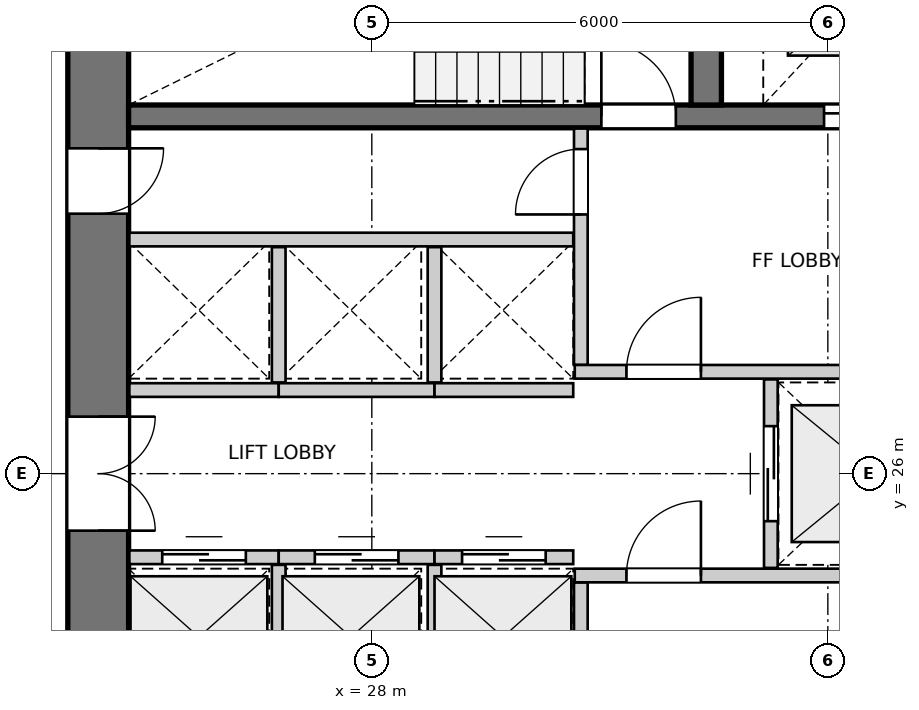
"""IFC4 building model, lengths in metres.
Left out: names, types, materials, properties, quantities, classifications, styles, units other than length and angle.
Written with IfcOpenShell. Run it as: python <this file> out.ifc"""

import sys

from ifc_helpers import new_model, si_unit, direction, frame, frame_2d, origin, place, context, subcontext, project, spatial, rectangle, extrude, source, transform, mapped, element, fill, save


model = new_model("IFC4")
c1 = context("Model", 3, precision=1e-05, world=origin(), true_north=direction((0.0, 1.0)))
c2 = subcontext(c1, "Body", "Model", "MODEL_VIEW")
j1 = project(units=[si_unit("LENGTHUNIT", "METRE"), si_unit("PLANEANGLEUNIT", "RADIAN")], contexts=[c1])
p1 = place(None, origin())
s1 = spatial("IfcSite", under=j1, at=p1, CompositionType="ELEMENT")
p2 = place(p1, origin())
s2 = spatial("IfcBuilding", under=s1, at=p2, CompositionType="ELEMENT")
p3 = place(p2, frame((0.0, 0.0, 14.2)))
s3 = spatial("IfcBuildingStorey", under=s2, at=p3, CompositionType="ELEMENT", Elevation=14.2)
p4 = place(p3, frame((24.4, 33.8, 0.0), z_axis=(0.0, 0.0, 1.0), x_axis=(0.0, -1.0, 0.0)))
e1 = element("IfcWall", 1, at=p4, inside=s3, PredefinedType="SHEAR", context=c2, shape_type="SweptSolid", body=[
    extrude(rectangle(XDim=15.6, YDim=0.8, at=frame_2d((7.8, 0.0))), origin(), (0.0, 0.0, 1.0), 2.94),
])
p5 = place(p4, frame((7.05, 0.0, 0.0)))
e2 = element("IfcOpeningElement", 2, at=p5, cuts=e1, PredefinedType="OPENING", context=c2, shape_type="SweptSolid", body=[
    extrude(rectangle(XDim=1.5, YDim=2.15, at=frame_2d((0.75, 1.075))), frame((0.0, 0.41, 0.0), z_axis=(0.0, -1.0, 0.0), x_axis=(1.0, 0.0, 0.0)), (0.0, 0.0, 1.0), 0.82),
])
p6 = place(p4, frame((3.52, 0.0, 0.0)))
e3 = element("IfcOpeningElement", 3, at=p6, cuts=e1, PredefinedType="OPENING", context=c2, shape_type="SweptSolid", body=[
    extrude(rectangle(XDim=0.86, YDim=2.05, at=frame_2d((0.43, 1.025))), frame((0.0, 0.41, 0.0), z_axis=(0.0, -1.0, 0.0), x_axis=(1.0, 0.0, 0.0)), (0.0, 0.0, 1.0), 0.82),
])
p7 = place(p4, frame((11.22, 0.0, 0.0)))
e4 = element("IfcOpeningElement", 4, at=p7, cuts=e1, PredefinedType="OPENING", context=c2, shape_type="SweptSolid", body=[
    extrude(rectangle(XDim=0.86, YDim=2.05, at=frame_2d((0.43, 1.025))), frame((0.0, 0.41, 0.0), z_axis=(0.0, -1.0, 0.0), x_axis=(1.0, 0.0, 0.0)), (0.0, 0.0, 1.0), 0.82),
])
p8 = place(p3, frame((24.8, 30.7, 0.0), z_axis=(0.0, 0.0, 1.0), x_axis=(1.0, 0.0, 0.0)))
e5 = element("IfcWall", 5, at=p8, inside=s3, PredefinedType="SHEAR", context=c2, shape_type="SweptSolid", body=[
    extrude(rectangle(XDim=11.1, YDim=0.3, at=frame_2d((5.55, 0.0))), origin(), (0.0, 0.0, 1.0), 2.94),
])
p9 = place(p8, frame((6.22, 0.0, 0.0)))
e6 = element("IfcOpeningElement", 6, at=p9, cuts=e5, PredefinedType="OPENING", context=c2, shape_type="SweptSolid", body=[
    extrude(rectangle(XDim=0.98, YDim=2.15, at=frame_2d((0.49, 1.075))), frame((0.0, 0.16, 0.0), z_axis=(0.0, -1.0, 0.0), x_axis=(1.0, 0.0, 0.0)), (0.0, 0.0, 1.0), 0.32),
])
p10 = place(p8, frame((9.15, 0.0, 0.0)))
e7 = element("IfcOpeningElement", 7, at=p10, cuts=e5, PredefinedType="OPENING", context=c2, shape_type="SweptSolid", body=[
    extrude(rectangle(XDim=1.15, YDim=2.15, at=frame_2d((0.575, 1.075))), frame((0.0, 0.16, 0.0), z_axis=(0.0, -1.0, 0.0), x_axis=(1.0, 0.0, 0.0)), (0.0, 0.0, 1.0), 0.32),
])
p11 = place(p3, frame((32.4, 30.85, 0.0), z_axis=(0.0, 0.0, 1.0), x_axis=(0.0, 1.0, 0.0)))
e8 = element("IfcWall", 8, at=p11, inside=s3, PredefinedType="SHEAR", context=c2, shape_type="SweptSolid", body=[
    extrude(rectangle(XDim=2.95, YDim=0.4, at=frame_2d((1.475, 0.0))), origin(), (0.0, 0.0, 1.0), 2.94),
])
p12 = place(p3, frame((30.75, 21.46, 0.0), z_axis=(0.0, 0.0, 1.0), x_axis=(0.0, 1.0, 0.0)))
e9 = element("IfcWall", 9, at=p12, inside=s3, PredefinedType="PARTITIONING", context=c2, shape_type="SweptSolid", body=[
    extrude(rectangle(XDim=3.11, YDim=0.18, at=frame_2d((1.555, 0.0))), origin(), (0.0, 0.0, 1.0), 2.94),
])
p13 = place(p12, frame((0.26, 0.0, 0.0)))
e10 = element("IfcOpeningElement", 10, at=p13, cuts=e9, PredefinedType="OPENING", context=c2, shape_type="SweptSolid", body=[
    extrude(rectangle(XDim=0.86, YDim=2.05, at=frame_2d((0.43, 1.025))), frame((0.0, 0.1, 0.0), z_axis=(0.0, -1.0, 0.0), x_axis=(1.0, 0.0, 0.0)), (0.0, 0.0, 1.0), 0.2),
])
p14 = place(p3, frame((30.67, 24.66, 0.0), z_axis=(0.0, 0.0, 1.0), x_axis=(1.0, 0.0, 0.0)))
e11 = element("IfcWall", 11, at=p14, inside=s3, PredefinedType="PARTITIONING", context=c2, shape_type="SweptSolid", body=[
    extrude(rectangle(XDim=5.22, YDim=0.18, at=frame_2d((2.61, 0.0))), origin(), (0.0, 0.0, 1.0), 2.94),
])
p15 = place(p14, frame((0.68, 0.0, 0.0)))
e12 = element("IfcOpeningElement", 12, at=p15, cuts=e11, PredefinedType="OPENING", context=c2, shape_type="SweptSolid", body=[
    extrude(rectangle(XDim=0.98, YDim=2.15, at=frame_2d((0.49, 1.075))), frame((0.0, 0.1, 0.0), z_axis=(0.0, -1.0, 0.0), x_axis=(1.0, 0.0, 0.0)), (0.0, 0.0, 1.0), 0.2),
])
p16 = place(p3, frame((30.75, 27.43, 0.0), z_axis=(0.0, 0.0, 1.0), x_axis=(0.0, 1.0, 0.0)))
e13 = element("IfcWall", 13, at=p16, inside=s3, PredefinedType="PARTITIONING", context=c2, shape_type="SweptSolid", body=[
    extrude(rectangle(XDim=3.11, YDim=0.18, at=frame_2d((1.555, 0.0))), origin(), (0.0, 0.0, 1.0), 2.94),
])
p17 = place(p16, frame((1.98, 0.0, 0.0)))
e14 = element("IfcOpeningElement", 14, at=p17, cuts=e13, PredefinedType="OPENING", context=c2, shape_type="SweptSolid", body=[
    extrude(rectangle(XDim=0.86, YDim=2.05, at=frame_2d((0.43, 1.025))), frame((0.0, 0.1, 0.0), z_axis=(0.0, -1.0, 0.0), x_axis=(1.0, 0.0, 0.0)), (0.0, 0.0, 1.0), 0.2),
])
p18 = place(p3, frame((30.67, 27.34, 0.0), z_axis=(0.0, 0.0, 1.0), x_axis=(1.0, 0.0, 0.0)))
e15 = element("IfcWall", 15, at=p18, inside=s3, PredefinedType="PARTITIONING", context=c2, shape_type="SweptSolid", body=[
    extrude(rectangle(XDim=5.22, YDim=0.18, at=frame_2d((2.61, 0.0))), origin(), (0.0, 0.0, 1.0), 2.94),
])
p19 = place(p18, frame((0.68, 0.0, 0.0)))
e16 = element("IfcOpeningElement", 16, at=p19, cuts=e15, PredefinedType="OPENING", context=c2, shape_type="SweptSolid", body=[
    extrude(rectangle(XDim=0.98, YDim=2.15, at=frame_2d((0.49, 1.075))), frame((0.0, 0.1, 0.0), z_axis=(0.0, -1.0, 0.0), x_axis=(1.0, 0.0, 0.0)), (0.0, 0.0, 1.0), 0.2),
])
p20 = place(p3, frame((33.25, 24.76, 0.0), z_axis=(0.0, 0.0, 1.0), x_axis=(0.0, 1.0, 0.0)))
e17 = element("IfcWall", 17, at=p20, inside=s3, PredefinedType="PARTITIONING", context=c2, shape_type="SweptSolid", body=[
    extrude(rectangle(XDim=2.48, YDim=0.18, at=frame_2d((1.24, 0.0))), origin(), (0.0, 0.0, 1.0), 2.94),
])
p21 = place(p20, frame((0.615, 0.0, 0.0)))
e18 = element("IfcOpeningElement", 18, at=p21, cuts=e17, PredefinedType="OPENING", context=c2, shape_type="SweptSolid", body=[
    extrude(rectangle(XDim=1.25, YDim=2.15, at=frame_2d((0.625, 1.075))), frame((0.0, 0.1, 0.0), z_axis=(0.0, -1.0, 0.0), x_axis=(1.0, 0.0, 0.0)), (0.0, 0.0, 1.0), 0.2),
])
p22 = place(p3, frame((24.81, 24.9, 0.0), z_axis=(0.0, 0.0, 1.0), x_axis=(1.0, 0.0, 0.0)))
e19 = element("IfcWall", 19, at=p22, inside=s3, PredefinedType="PARTITIONING", context=c2, shape_type="SweptSolid", body=[
    extrude(rectangle(XDim=1.965, YDim=0.18, at=frame_2d((0.982, 0.0))), origin(), (0.0, 0.0, 1.0), 2.94),
])
p23 = place(p22, frame((0.433, 0.0, 0.0)))
e20 = element("IfcOpeningElement", 20, at=p23, cuts=e19, PredefinedType="OPENING", context=c2, shape_type="SweptSolid", body=[
    extrude(rectangle(XDim=1.1, YDim=2.15, at=frame_2d((0.55, 1.075))), frame((0.0, 0.1, 0.0), z_axis=(0.0, -1.0, 0.0), x_axis=(1.0, 0.0, 0.0)), (0.0, 0.0, 1.0), 0.2),
])
p24 = place(p3, frame((26.775, 24.9, 0.0), z_axis=(0.0, 0.0, 1.0), x_axis=(1.0, 0.0, 0.0)))
e21 = element("IfcWall", 21, at=p24, inside=s3, PredefinedType="PARTITIONING", context=c2, shape_type="SweptSolid", body=[
    extrude(rectangle(XDim=2.05, YDim=0.18, at=frame_2d((1.025, 0.0))), origin(), (0.0, 0.0, 1.0), 2.94),
])
p25 = place(p24, frame((0.475, 0.0, 0.0)))
e22 = element("IfcOpeningElement", 22, at=p25, cuts=e21, PredefinedType="OPENING", context=c2, shape_type="SweptSolid", body=[
    extrude(rectangle(XDim=1.1, YDim=2.15, at=frame_2d((0.55, 1.075))), frame((0.0, 0.1, 0.0), z_axis=(0.0, -1.0, 0.0), x_axis=(1.0, 0.0, 0.0)), (0.0, 0.0, 1.0), 0.2),
])
p26 = place(p3, frame((26.775, 23.02, 0.0), z_axis=(0.0, 0.0, 1.0), x_axis=(0.0, 1.0, 0.0)))
e23 = element("IfcWall", 23, at=p26, inside=s3, PredefinedType="PARTITIONING", context=c2, shape_type="SweptSolid", body=[
    extrude(rectangle(XDim=1.78, YDim=0.18, at=frame_2d((0.89, 0.0))), origin(), (0.0, 0.0, 1.0), 2.94),
])
p27 = place(p3, frame((28.825, 24.9, 0.0), z_axis=(0.0, 0.0, 1.0), x_axis=(1.0, 0.0, 0.0)))
e24 = element("IfcWall", 24, at=p27, inside=s3, PredefinedType="PARTITIONING", context=c2, shape_type="SweptSolid", body=[
    extrude(rectangle(XDim=1.825, YDim=0.18, at=frame_2d((0.913, 0.0))), origin(), (0.0, 0.0, 1.0), 2.94),
])
p28 = place(p27, frame((0.363, 0.0, 0.0)))
e25 = element("IfcOpeningElement", 25, at=p28, cuts=e24, PredefinedType="OPENING", context=c2, shape_type="SweptSolid", body=[
    extrude(rectangle(XDim=1.1, YDim=2.15, at=frame_2d((0.55, 1.075))), frame((0.0, 0.1, 0.0), z_axis=(0.0, -1.0, 0.0), x_axis=(1.0, 0.0, 0.0)), (0.0, 0.0, 1.0), 0.2),
])
p29 = place(p3, frame((28.825, 23.02, 0.0), z_axis=(0.0, 0.0, 1.0), x_axis=(0.0, 1.0, 0.0)))
e26 = element("IfcWall", 26, at=p29, inside=s3, PredefinedType="PARTITIONING", context=c2, shape_type="SweptSolid", body=[
    extrude(rectangle(XDim=1.78, YDim=0.18, at=frame_2d((0.89, 0.0))), origin(), (0.0, 0.0, 1.0), 2.94),
])
p30 = place(p3, frame((24.81, 29.08, 0.0), z_axis=(0.0, 0.0, 1.0), x_axis=(1.0, 0.0, 0.0)))
e27 = element("IfcWall", 27, at=p30, inside=s3, PredefinedType="PARTITIONING", context=c2, shape_type="SweptSolid", body=[
    extrude(rectangle(XDim=5.84, YDim=0.18, at=frame_2d((2.92, 0.0))), origin(), (0.0, 0.0, 1.0), 2.94),
])
p31 = place(p3, frame((24.81, 27.1, 0.0), z_axis=(0.0, 0.0, 1.0), x_axis=(1.0, 0.0, 0.0)))
e28 = element("IfcWall", 28, at=p31, inside=s3, PredefinedType="PARTITIONING", context=c2, shape_type="SweptSolid", body=[
    extrude(rectangle(XDim=1.965, YDim=0.18, at=frame_2d((0.982, 0.0))), origin(), (0.0, 0.0, 1.0), 2.94),
])
p32 = place(p3, frame((26.775, 27.1, 0.0), z_axis=(0.0, 0.0, 1.0), x_axis=(1.0, 0.0, 0.0)))
e29 = element("IfcWall", 29, at=p32, inside=s3, PredefinedType="PARTITIONING", context=c2, shape_type="SweptSolid", body=[
    extrude(rectangle(XDim=2.05, YDim=0.18, at=frame_2d((1.025, 0.0))), origin(), (0.0, 0.0, 1.0), 2.94),
])
p33 = place(p3, frame((26.775, 27.2, 0.0), z_axis=(0.0, 0.0, 1.0), x_axis=(0.0, 1.0, 0.0)))
e30 = element("IfcWall", 30, at=p33, inside=s3, PredefinedType="PARTITIONING", context=c2, shape_type="SweptSolid", body=[
    extrude(rectangle(XDim=1.78, YDim=0.18, at=frame_2d((0.89, 0.0))), origin(), (0.0, 0.0, 1.0), 2.94),
])
p34 = place(p3, frame((28.825, 27.1, 0.0), z_axis=(0.0, 0.0, 1.0), x_axis=(1.0, 0.0, 0.0)))
e31 = element("IfcWall", 31, at=p34, inside=s3, PredefinedType="PARTITIONING", context=c2, shape_type="SweptSolid", body=[
    extrude(rectangle(XDim=1.825, YDim=0.18, at=frame_2d((0.913, 0.0))), origin(), (0.0, 0.0, 1.0), 2.94),
])
p35 = place(p3, frame((28.825, 27.2, 0.0), z_axis=(0.0, 0.0, 1.0), x_axis=(0.0, 1.0, 0.0)))
e32 = element("IfcWall", 32, at=p35, inside=s3, PredefinedType="PARTITIONING", context=c2, shape_type="SweptSolid", body=[
    extrude(rectangle(XDim=1.78, YDim=0.18, at=frame_2d((0.89, 0.0))), origin(), (0.0, 0.0, 1.0), 2.94),
])
m1 = source(origin(), c2, "Body", "SweptSolid", [
    extrude(rectangle(XDim=0.98, YDim=2.15, at=frame_2d((0.49, 1.075))), frame((0.0, 0.025, 0.0), z_axis=(0.0, -1.0, 0.0), x_axis=(1.0, 0.0, 0.0)), (0.0, 0.0, 1.0), 0.05),
])
p36 = place(p9, origin())
e33 = element("IfcDoor", 33, at=p36, inside=s3, OperationType="SINGLE_SWING_LEFT", PredefinedType="DOOR", context=c2, shape_type="MappedRepresentation", body=[
    mapped(m1, transform((0.0, 0.0, 0.0), x_axis=(1.0, 0.0, 0.0), y_axis=(0.0, 1.0, 0.0), z_axis=(0.0, 0.0, 1.0), scale=1.0)),
])
fill(e6, e33)
m2 = source(origin(), c2, "Body", "SweptSolid", [
    extrude(rectangle(XDim=1.15, YDim=2.15, at=frame_2d((0.575, 1.075))), frame((0.0, 0.025, 0.0), z_axis=(0.0, -1.0, 0.0), x_axis=(1.0, 0.0, 0.0)), (0.0, 0.0, 1.0), 0.05),
])
p37 = place(p10, origin())
e34 = element("IfcDoor", 34, at=p37, inside=s3, OperationType="DOUBLE_DOOR_SLIDING", PredefinedType="DOOR", context=c2, shape_type="MappedRepresentation", body=[
    mapped(m2, transform((0.0, 0.0, 0.0), x_axis=(1.0, 0.0, 0.0), y_axis=(0.0, 1.0, 0.0), z_axis=(0.0, 0.0, 1.0), scale=1.0)),
])
fill(e7, e34)
m3 = source(origin(), c2, "Body", "SweptSolid", [
    extrude(rectangle(XDim=1.5, YDim=2.15, at=frame_2d((0.75, 1.075))), frame((0.0, 0.025, 0.0), z_axis=(0.0, -1.0, 0.0), x_axis=(1.0, 0.0, 0.0)), (0.0, 0.0, 1.0), 0.05),
])
p38 = place(p5, origin())
e35 = element("IfcDoor", 35, at=p38, inside=s3, OperationType="DOUBLE_DOOR_SINGLE_SWING", PredefinedType="DOOR", context=c2, shape_type="MappedRepresentation", body=[
    mapped(m3, transform((0.0, 0.0, 0.0), x_axis=(1.0, 0.0, 0.0), y_axis=(0.0, 1.0, 0.0), z_axis=(0.0, 0.0, 1.0), scale=1.0)),
])
fill(e2, e35)
m4 = source(origin(), c2, "Body", "SweptSolid", [
    extrude(rectangle(XDim=0.86, YDim=2.05, at=frame_2d((0.43, 1.025))), frame((0.0, 0.025, 0.0), z_axis=(0.0, -1.0, 0.0), x_axis=(1.0, 0.0, 0.0)), (0.0, 0.0, 1.0), 0.05),
])
p39 = place(p6, origin())
e36 = element("IfcDoor", 36, at=p39, inside=s3, OperationType="SINGLE_SWING_LEFT", PredefinedType="DOOR", context=c2, shape_type="MappedRepresentation", body=[
    mapped(m4, transform((0.0, 0.0, 0.0), x_axis=(1.0, 0.0, 0.0), y_axis=(0.0, 1.0, 0.0), z_axis=(0.0, 0.0, 1.0), scale=1.0)),
])
fill(e3, e36)
p40 = place(p15, origin())
e37 = element("IfcDoor", 37, at=p40, inside=s3, OperationType="SINGLE_SWING_RIGHT", PredefinedType="DOOR", context=c2, shape_type="MappedRepresentation", body=[
    mapped(m1, transform((0.0, 0.0, 0.0), x_axis=(1.0, 0.0, 0.0), y_axis=(0.0, 1.0, 0.0), z_axis=(0.0, 0.0, 1.0), scale=1.0)),
])
fill(e12, e37)
p41 = place(p17, origin())
e38 = element("IfcDoor", 38, at=p41, inside=s3, OperationType="SINGLE_SWING_LEFT", PredefinedType="DOOR", context=c2, shape_type="MappedRepresentation", body=[
    mapped(m4, transform((0.0, 0.0, 0.0), x_axis=(1.0, 0.0, 0.0), y_axis=(0.0, 1.0, 0.0), z_axis=(0.0, 0.0, 1.0), scale=1.0)),
])
fill(e14, e38)
p42 = place(p19, origin())
e39 = element("IfcDoor", 39, at=p42, inside=s3, OperationType="SINGLE_SWING_RIGHT", PredefinedType="DOOR", context=c2, shape_type="MappedRepresentation", body=[
    mapped(m1, transform((0.0, 0.0, 0.0), x_axis=(1.0, 0.0, 0.0), y_axis=(0.0, 1.0, 0.0), z_axis=(0.0, 0.0, 1.0), scale=1.0)),
])
fill(e16, e39)
m5 = source(origin(), c2, "Body", "SweptSolid", [
    extrude(rectangle(XDim=1.25, YDim=2.15, at=frame_2d((0.625, 1.075))), frame((0.0, 0.025, 0.0), z_axis=(0.0, -1.0, 0.0), x_axis=(1.0, 0.0, 0.0)), (0.0, 0.0, 1.0), 0.05),
])
p43 = place(p21, origin())
e40 = element("IfcDoor", 40, at=p43, inside=s3, OperationType="DOUBLE_DOOR_SLIDING", PredefinedType="DOOR", context=c2, shape_type="MappedRepresentation", body=[
    mapped(m5, transform((0.0, 0.0, 0.0), x_axis=(1.0, 0.0, 0.0), y_axis=(0.0, 1.0, 0.0), z_axis=(0.0, 0.0, 1.0), scale=1.0)),
])
fill(e18, e40)
m6 = source(origin(), c2, "Body", "SweptSolid", [
    extrude(rectangle(XDim=1.1, YDim=2.15, at=frame_2d((0.55, 1.075))), frame((0.0, 0.025, 0.0), z_axis=(0.0, -1.0, 0.0), x_axis=(1.0, 0.0, 0.0)), (0.0, 0.0, 1.0), 0.05),
])
p44 = place(p23, origin())
e41 = element("IfcDoor", 41, at=p44, inside=s3, OperationType="DOUBLE_DOOR_SLIDING", PredefinedType="DOOR", context=c2, shape_type="MappedRepresentation", body=[
    mapped(m6, transform((0.0, 0.0, 0.0), x_axis=(1.0, 0.0, 0.0), y_axis=(0.0, 1.0, 0.0), z_axis=(0.0, 0.0, 1.0), scale=1.0)),
])
fill(e20, e41)
p45 = place(p25, origin())
e42 = element("IfcDoor", 42, at=p45, inside=s3, OperationType="DOUBLE_DOOR_SLIDING", PredefinedType="DOOR", context=c2, shape_type="MappedRepresentation", body=[
    mapped(m6, transform((0.0, 0.0, 0.0), x_axis=(1.0, 0.0, 0.0), y_axis=(0.0, 1.0, 0.0), z_axis=(0.0, 0.0, 1.0), scale=1.0)),
])
fill(e22, e42)
p46 = place(p28, origin())
e43 = element("IfcDoor", 43, at=p46, inside=s3, OperationType="DOUBLE_DOOR_SLIDING", PredefinedType="DOOR", context=c2, shape_type="MappedRepresentation", body=[
    mapped(m6, transform((0.0, 0.0, 0.0), x_axis=(1.0, 0.0, 0.0), y_axis=(0.0, 1.0, 0.0), z_axis=(0.0, 0.0, 1.0), scale=1.0)),
])
fill(e25, e43)
save(model, sys.argv[1])
